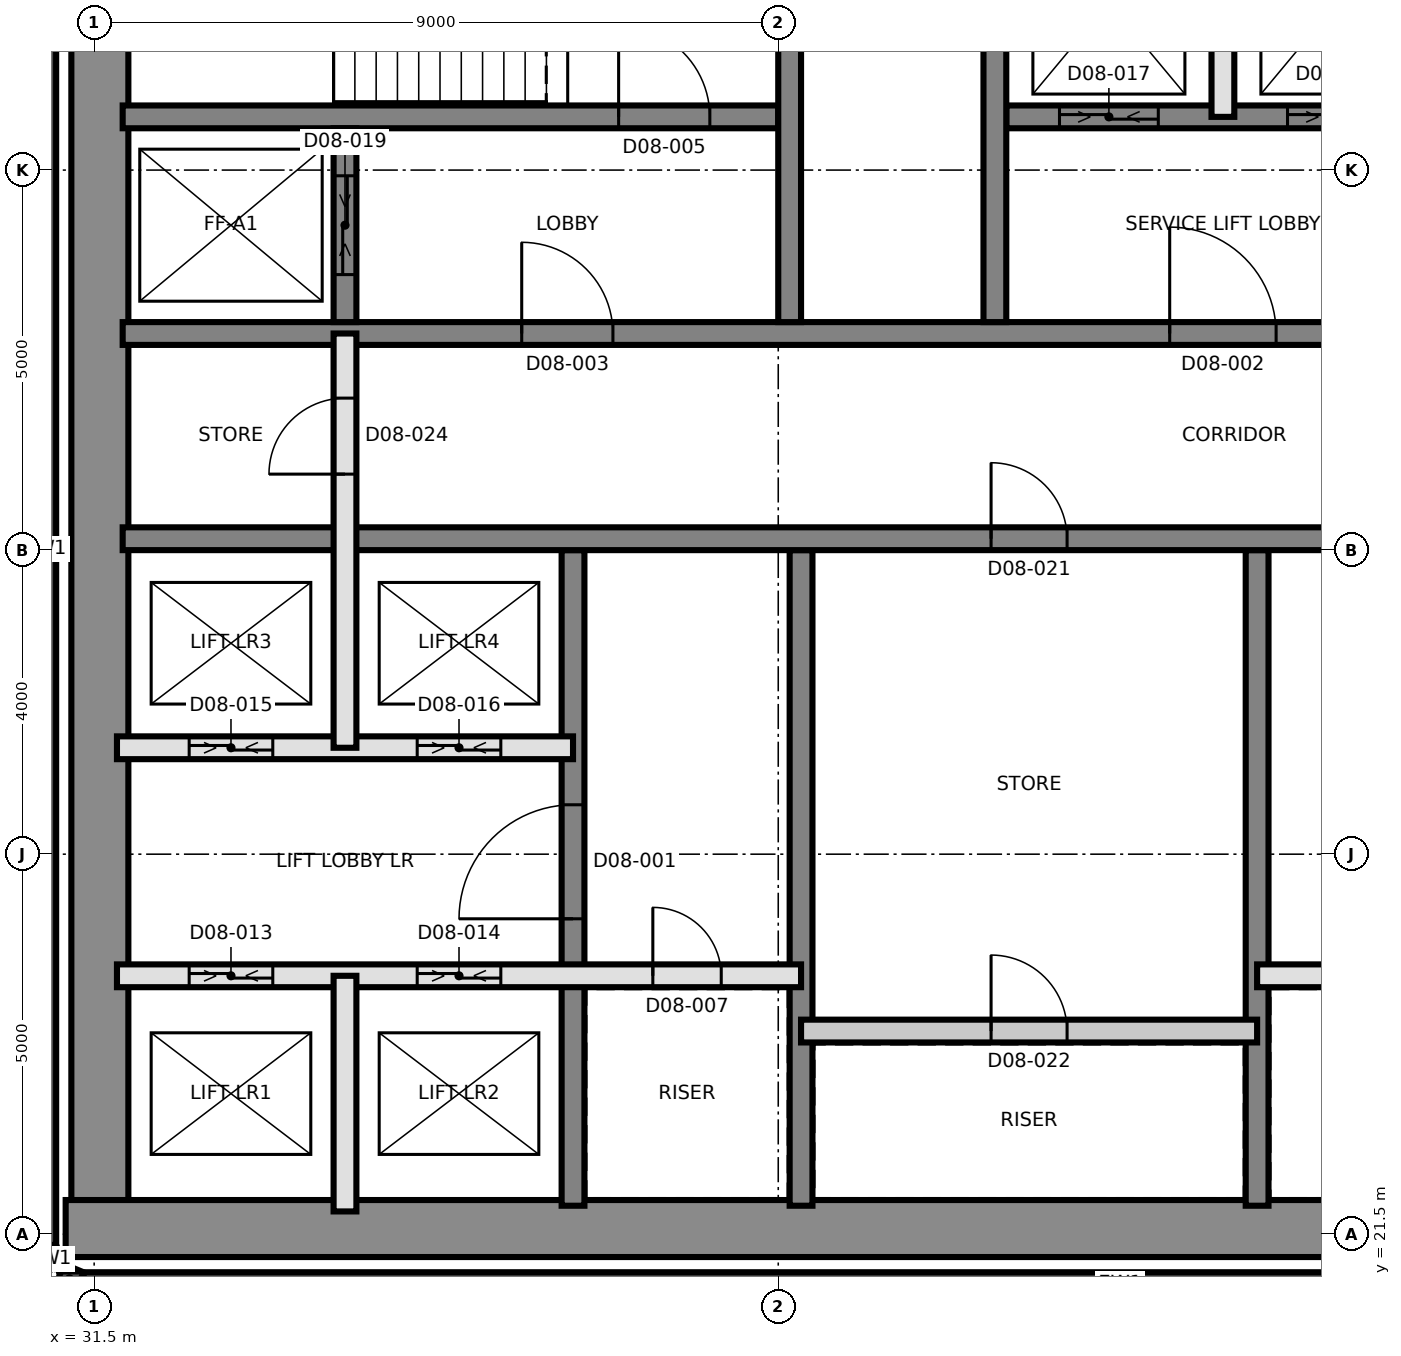
"""IFC4 building model, lengths in metres.
Left out: names, types, materials, properties, quantities, classifications, styles, units other than length and angle.
Written with IfcOpenShell. Run it as: python <this file> out.ifc"""

import sys

from ifc_helpers import new_model, si_unit, direction, frame, frame_2d, origin, place, context, subcontext, project, spatial, rectangle, extrude, element, fill, save


model = new_model("IFC4")
c1 = context("Model", 3, precision=1e-05, world=origin(), true_north=direction((0.0, 1.0)))
c2 = subcontext(c1, "Body", "Model", "MODEL_VIEW")
j1 = project(units=[si_unit("LENGTHUNIT", "METRE"), si_unit("PLANEANGLEUNIT", "RADIAN")], contexts=[c1])
p1 = place(None, origin())
s1 = spatial("IfcSite", under=j1, at=p1, CompositionType="ELEMENT")
p2 = place(p1, origin())
s2 = spatial("IfcBuilding", under=s1, at=p2, CompositionType="ELEMENT")
p3 = place(p2, frame((0.0, 0.0, 101.9)))
s3 = spatial("IfcBuildingStorey", under=s2, at=p3, CompositionType="ELEMENT", Elevation=101.9)
p4 = place(p3, frame((31.575, 21.875, 0.0), z_axis=(0.0, 0.0, 1.0), x_axis=(0.0, 1.0, 0.0)))
e1 = element("IfcWall", 1, at=p4, inside=s3, PredefinedType="SHEAR", context=c2, shape_type="SweptSolid", body=[
    extrude(rectangle(XDim=17.25, YDim=0.75, at=frame_2d((8.625, 0.0))), origin(), (0.0, 0.0, 1.0), 3.7),
])
p5 = place(p3, frame((31.125, 21.575, 0.0), z_axis=(0.0, 0.0, 1.0), x_axis=(1.0, 0.0, 0.0)))
e2 = element("IfcWall", 2, at=p5, inside=s3, PredefinedType="SHEAR", context=c2, shape_type="SweptSolid", body=[
    extrude(rectangle(XDim=27.0, YDim=0.75, at=frame_2d((13.5, 0.0))), origin(), (0.0, 0.0, 1.0), 3.7),
])
p6 = place(p3, frame((37.8, 21.875, 0.0), z_axis=(0.0, 0.0, 1.0), x_axis=(0.0, 1.0, 0.0)))
e3 = element("IfcWall", 3, at=p6, inside=s3, PredefinedType="SHEAR", context=c2, shape_type="SweptSolid", body=[
    extrude(rectangle(XDim=8.625, YDim=0.3, at=frame_2d((4.312, 0.0))), origin(), (0.0, 0.0, 1.0), 3.7),
])
p7 = place(p6, frame((3.775, 0.0, 0.0)))
e4 = element("IfcOpeningElement", 4, at=p7, cuts=e3, PredefinedType="OPENING", context=c2, shape_type="SweptSolid", body=[
    extrude(rectangle(XDim=1.5, YDim=2.1, at=frame_2d((0.75, 1.05))), frame((0.0, 0.16, 0.0), z_axis=(0.0, -1.0, 0.0), x_axis=(1.0, 0.0, 0.0)), (0.0, 0.0, 1.0), 0.32),
])
for number, where, z_axis, x_axis in (
    (5, (40.8, 21.875, 0.0), (0.0, 0.0, 1.0), (0.0, 1.0, 0.0)),
    (6, (46.8, 21.875, 0.0), (0.0, 0.0, 1.0), (0.0, 1.0, 0.0)),
):
    element("IfcWall", number, at=place(p3, frame(where, z_axis=z_axis, x_axis=x_axis)), inside=s3, PredefinedType="SHEAR", context=c2, shape_type="SweptSolid", body=[
        extrude(rectangle(XDim=8.625, YDim=0.3, at=frame_2d((4.312, 0.0))), origin(), (0.0, 0.0, 1.0), 3.7),
    ])
p8 = place(p3, frame((31.875, 30.65, 0.0), z_axis=(0.0, 0.0, 1.0), x_axis=(1.0, 0.0, 0.0)))
e7 = element("IfcWall", 7, at=p8, inside=s3, PredefinedType="SHEAR", context=c2, shape_type="SweptSolid", body=[
    extrude(rectangle(XDim=26.25, YDim=0.3, at=frame_2d((13.125, 0.0))), origin(), (0.0, 0.0, 1.0), 3.7),
])
p9 = place(p8, frame((24.625, 0.0, 0.0)))
e8 = element("IfcOpeningElement", 8, at=p9, cuts=e7, PredefinedType="OPENING", context=c2, shape_type="SweptSolid", body=[
    extrude(rectangle(XDim=1.0, YDim=2.1, at=frame_2d((0.5, 1.05))), frame((0.0, 0.16, 0.0), z_axis=(0.0, -1.0, 0.0), x_axis=(1.0, 0.0, 0.0)), (0.0, 0.0, 1.0), 0.32),
])
p10 = place(p8, frame((11.425, 0.0, 0.0)))
e9 = element("IfcOpeningElement", 9, at=p10, cuts=e7, PredefinedType="OPENING", context=c2, shape_type="SweptSolid", body=[
    extrude(rectangle(XDim=1.0, YDim=2.1, at=frame_2d((0.5, 1.05))), frame((0.0, 0.16, 0.0), z_axis=(0.0, -1.0, 0.0), x_axis=(1.0, 0.0, 0.0)), (0.0, 0.0, 1.0), 0.32),
])
p11 = place(p3, frame((31.875, 33.35, 0.0), z_axis=(0.0, 0.0, 1.0), x_axis=(1.0, 0.0, 0.0)))
e10 = element("IfcWall", 10, at=p11, inside=s3, PredefinedType="SHEAR", context=c2, shape_type="SweptSolid", body=[
    extrude(rectangle(XDim=26.25, YDim=0.3, at=frame_2d((13.125, 0.0))), origin(), (0.0, 0.0, 1.0), 3.7),
])
p12 = place(p11, frame((13.775, 0.0, 0.0)))
e11 = element("IfcOpeningElement", 11, at=p12, cuts=e10, PredefinedType="OPENING", context=c2, shape_type="SweptSolid", body=[
    extrude(rectangle(XDim=1.4, YDim=2.1, at=frame_2d((0.7, 1.05))), frame((0.0, 0.16, 0.0), z_axis=(0.0, -1.0, 0.0), x_axis=(1.0, 0.0, 0.0)), (0.0, 0.0, 1.0), 0.32),
])
p13 = place(p11, frame((5.25, 0.0, 0.0)))
e12 = element("IfcOpeningElement", 12, at=p13, cuts=e10, PredefinedType="OPENING", context=c2, shape_type="SweptSolid", body=[
    extrude(rectangle(XDim=1.2, YDim=2.1, at=frame_2d((0.6, 1.05))), frame((0.0, 0.16, 0.0), z_axis=(0.0, -1.0, 0.0), x_axis=(1.0, 0.0, 0.0)), (0.0, 0.0, 1.0), 0.32),
])
p14 = place(p11, frame((19.8, 0.0, 0.0)))
e13 = element("IfcOpeningElement", 13, at=p14, cuts=e10, PredefinedType="OPENING", context=c2, shape_type="SweptSolid", body=[
    extrude(rectangle(XDim=1.2, YDim=2.1, at=frame_2d((0.6, 1.05))), frame((0.0, 0.16, 0.0), z_axis=(0.0, -1.0, 0.0), x_axis=(1.0, 0.0, 0.0)), (0.0, 0.0, 1.0), 0.32),
])
p15 = place(p3, frame((31.875, 36.2, 0.0), z_axis=(0.0, 0.0, 1.0), x_axis=(1.0, 0.0, 0.0)))
e14 = element("IfcWall", 14, at=p15, inside=s3, PredefinedType="SHEAR", context=c2, shape_type="SweptSolid", body=[
    extrude(rectangle(XDim=8.625, YDim=0.3, at=frame_2d((4.312, 0.0))), origin(), (0.0, 0.0, 1.0), 3.7),
])
p16 = place(p15, frame((6.525, 0.0, 0.0)))
e15 = element("IfcOpeningElement", 15, at=p16, cuts=e14, PredefinedType="OPENING", context=c2, shape_type="SweptSolid", body=[
    extrude(rectangle(XDim=1.2, YDim=2.1, at=frame_2d((0.6, 1.05))), frame((0.0, 0.16, 0.0), z_axis=(0.0, -1.0, 0.0), x_axis=(1.0, 0.0, 0.0)), (0.0, 0.0, 1.0), 0.32),
])
p17 = place(p3, frame((43.5, 36.2, 0.0), z_axis=(0.0, 0.0, 1.0), x_axis=(1.0, 0.0, 0.0)))
e16 = element("IfcWall", 16, at=p17, inside=s3, PredefinedType="SHEAR", context=c2, shape_type="SweptSolid", body=[
    extrude(rectangle(XDim=14.625, YDim=0.3, at=frame_2d((7.312, 0.0))), origin(), (0.0, 0.0, 1.0), 3.7),
])
p18 = place(p17, frame((6.9, 0.0, 0.0)))
e17 = element("IfcOpeningElement", 17, at=p18, cuts=e16, PredefinedType="OPENING", context=c2, shape_type="SweptSolid", body=[
    extrude(rectangle(XDim=1.2, YDim=2.1, at=frame_2d((0.6, 1.05))), frame((0.0, 0.16, 0.0), z_axis=(0.0, -1.0, 0.0), x_axis=(1.0, 0.0, 0.0)), (0.0, 0.0, 1.0), 0.32),
])
p19 = place(p17, frame((0.7, 0.0, 0.0)))
e18 = element("IfcOpeningElement", 18, at=p19, cuts=e16, PredefinedType="OPENING", context=c2, shape_type="SweptSolid", body=[
    extrude(rectangle(XDim=1.3, YDim=2.4, at=frame_2d((0.65, 1.2))), frame((0.0, 0.16, 0.0), z_axis=(0.0, -1.0, 0.0), x_axis=(1.0, 0.0, 0.0)), (0.0, 0.0, 1.0), 0.32),
])
p20 = place(p17, frame((3.7, 0.0, 0.0)))
e19 = element("IfcOpeningElement", 19, at=p20, cuts=e16, PredefinedType="OPENING", context=c2, shape_type="SweptSolid", body=[
    extrude(rectangle(XDim=1.3, YDim=2.4, at=frame_2d((0.65, 1.2))), frame((0.0, 0.16, 0.0), z_axis=(0.0, -1.0, 0.0), x_axis=(1.0, 0.0, 0.0)), (0.0, 0.0, 1.0), 0.32),
])
for number, where, z_axis, x_axis in (
    (20, (40.65, 33.5, 0.0), (0.0, 0.0, 1.0), (0.0, 1.0, 0.0)),
    (21, (43.35, 33.5, 0.0), (0.0, 0.0, 1.0), (0.0, 1.0, 0.0)),
):
    element("IfcWall", number, at=place(p3, frame(where, z_axis=z_axis, x_axis=x_axis)), inside=s3, PredefinedType="SHEAR", context=c2, shape_type="SweptSolid", body=[
        extrude(rectangle(XDim=5.625, YDim=0.3, at=frame_2d((2.812, 0.0))), origin(), (0.0, 0.0, 1.0), 3.7),
    ])
p21 = place(p3, frame((34.8, 33.5, 0.0), z_axis=(0.0, 0.0, 1.0), x_axis=(0.0, 1.0, 0.0)))
e22 = element("IfcWall", 22, at=p21, inside=s3, PredefinedType="SHEAR", context=c2, shape_type="SweptSolid", body=[
    extrude(rectangle(XDim=2.55, YDim=0.3, at=frame_2d((1.275, 0.0))), origin(), (0.0, 0.0, 1.0), 3.7),
])
p22 = place(p21, frame((0.625, 0.0, 0.0)))
e23 = element("IfcOpeningElement", 23, at=p22, cuts=e22, PredefinedType="OPENING", context=c2, shape_type="SweptSolid", body=[
    extrude(rectangle(XDim=1.3, YDim=2.4, at=frame_2d((0.65, 1.2))), frame((0.0, 0.16, 0.0), z_axis=(0.0, -1.0, 0.0), x_axis=(1.0, 0.0, 0.0)), (0.0, 0.0, 1.0), 0.32),
])
p23 = place(p3, frame((30.85, 39.67, 0.0), z_axis=(0.0, 0.0, 1.0), x_axis=(0.0, -1.0, 0.0)))
e24 = element("IfcWall", 24, at=p23, inside=s3, PredefinedType="SOLIDWALL", context=c2, shape_type="SweptSolid", body=[
    extrude(rectangle(XDim=18.31, YDim=0.3, at=frame_2d((9.155, 0.0))), origin(), (0.0, 0.0, 1.0), 3.4),
])
for number, where, z_axis, x_axis in (
    (25, (30.861, 21.302, 0.0), (0.0, 0.0, 1.0), (0.383, -0.924, 0.0)),
    (26, (31.048, 20.967, 0.0), (0.0, 0.0, 1.0), (0.924, -0.383, 0.0)),
):
    element("IfcWall", number, at=place(p3, frame(where, z_axis=z_axis, x_axis=x_axis)), inside=s3, PredefinedType="SOLIDWALL", context=c2, shape_type="SweptSolid", body=[
        extrude(rectangle(XDim=0.275, YDim=0.3, at=frame_2d((0.138, 0.0))), origin(), (0.0, 0.0, 1.0), 3.4),
    ])
p24 = place(p3, frame((31.36, 20.85, 0.0), z_axis=(0.0, 0.0, 1.0), x_axis=(1.0, 0.0, 0.0)))
e27 = element("IfcWall", 27, at=p24, inside=s3, PredefinedType="SOLIDWALL", context=c2, shape_type="SweptSolid", body=[
    extrude(rectangle(XDim=27.281, YDim=0.3, at=frame_2d((13.64, 0.0))), origin(), (0.0, 0.0, 1.0), 3.4),
])
p25 = place(p3, frame((40.8, 24.173, 0.0), z_axis=(0.0, 0.0, 1.0), x_axis=(1.0, 0.0, 0.0)))
e28 = element("IfcWall", 28, at=p25, inside=s3, PredefinedType="PARTITIONING", context=c2, shape_type="SweptSolid", body=[
    extrude(rectangle(XDim=6.0, YDim=0.3, at=frame_2d((3.0, 0.0))), origin(), (0.0, 0.0, 1.0), 3.4),
])
p26 = place(p25, frame((2.5, 0.0, 0.0)))
e29 = element("IfcOpeningElement", 29, at=p26, cuts=e28, PredefinedType="OPENING", context=c2, shape_type="SweptSolid", body=[
    extrude(rectangle(XDim=1.0, YDim=2.1, at=frame_2d((0.5, 1.05))), frame((0.0, 0.16, 0.0), z_axis=(0.0, -1.0, 0.0), x_axis=(1.0, 0.0, 0.0)), (0.0, 0.0, 1.0), 0.32),
])
p27 = place(p3, frame((31.8, 24.9, 0.0), z_axis=(0.0, 0.0, 1.0), x_axis=(1.0, 0.0, 0.0)))
e30 = element("IfcWall", 30, at=p27, inside=s3, PredefinedType="SOLIDWALL", context=c2, shape_type="SweptSolid", body=[
    extrude(rectangle(XDim=9.0, YDim=0.3, at=frame_2d((4.5, 0.0))), origin(), (0.0, 0.0, 1.0), 3.4),
])
p28 = place(p27, frame((7.05, 0.0, 0.0)))
e31 = element("IfcOpeningElement", 31, at=p28, cuts=e30, PredefinedType="OPENING", context=c2, shape_type="SweptSolid", body=[
    extrude(rectangle(XDim=0.9, YDim=2.1, at=frame_2d((0.45, 1.05))), frame((0.0, 0.16, 0.0), z_axis=(0.0, -1.0, 0.0), x_axis=(1.0, 0.0, 0.0)), (0.0, 0.0, 1.0), 0.32),
])
p29 = place(p27, frame((0.95, 0.0, 0.0)))
e32 = element("IfcOpeningElement", 32, at=p29, cuts=e30, PredefinedType="OPENING", context=c2, shape_type="SweptSolid", body=[
    extrude(rectangle(XDim=1.1, YDim=2.4, at=frame_2d((0.55, 1.2))), frame((0.0, 0.16, 0.0), z_axis=(0.0, -1.0, 0.0), x_axis=(1.0, 0.0, 0.0)), (0.0, 0.0, 1.0), 0.32),
])
p30 = place(p27, frame((3.95, 0.0, 0.0)))
e33 = element("IfcOpeningElement", 33, at=p30, cuts=e30, PredefinedType="OPENING", context=c2, shape_type="SweptSolid", body=[
    extrude(rectangle(XDim=1.1, YDim=2.4, at=frame_2d((0.55, 1.2))), frame((0.0, 0.16, 0.0), z_axis=(0.0, -1.0, 0.0), x_axis=(1.0, 0.0, 0.0)), (0.0, 0.0, 1.0), 0.32),
])
p31 = place(p3, frame((46.8, 24.9, 0.0), z_axis=(0.0, 0.0, 1.0), x_axis=(1.0, 0.0, 0.0)))
e34 = element("IfcWall", 34, at=p31, inside=s3, PredefinedType="SOLIDWALL", context=c2, shape_type="SweptSolid", body=[
    extrude(rectangle(XDim=9.0, YDim=0.3, at=frame_2d((4.5, 0.0))), origin(), (0.0, 0.0, 1.0), 3.4),
])
p32 = place(p31, frame((1.05, 0.0, 0.0)))
e35 = element("IfcOpeningElement", 35, at=p32, cuts=e34, PredefinedType="OPENING", context=c2, shape_type="SweptSolid", body=[
    extrude(rectangle(XDim=0.9, YDim=2.1, at=frame_2d((0.45, 1.05))), frame((0.0, 0.16, 0.0), z_axis=(0.0, -1.0, 0.0), x_axis=(1.0, 0.0, 0.0)), (0.0, 0.0, 1.0), 0.32),
])
p33 = place(p3, frame((31.8, 27.9, 0.0), z_axis=(0.0, 0.0, 1.0), x_axis=(1.0, 0.0, 0.0)))
e36 = element("IfcWall", 36, at=p33, inside=s3, PredefinedType="SOLIDWALL", context=c2, shape_type="SweptSolid", body=[
    extrude(rectangle(XDim=6.0, YDim=0.3, at=frame_2d((3.0, 0.0))), origin(), (0.0, 0.0, 1.0), 3.4),
])
p34 = place(p33, frame((0.95, 0.0, 0.0)))
e37 = element("IfcOpeningElement", 37, at=p34, cuts=e36, PredefinedType="OPENING", context=c2, shape_type="SweptSolid", body=[
    extrude(rectangle(XDim=1.1, YDim=2.4, at=frame_2d((0.55, 1.2))), frame((0.0, 0.16, 0.0), z_axis=(0.0, -1.0, 0.0), x_axis=(1.0, 0.0, 0.0)), (0.0, 0.0, 1.0), 0.32),
])
p35 = place(p33, frame((3.95, 0.0, 0.0)))
e38 = element("IfcOpeningElement", 38, at=p35, cuts=e36, PredefinedType="OPENING", context=c2, shape_type="SweptSolid", body=[
    extrude(rectangle(XDim=1.1, YDim=2.4, at=frame_2d((0.55, 1.2))), frame((0.0, 0.16, 0.0), z_axis=(0.0, -1.0, 0.0), x_axis=(1.0, 0.0, 0.0)), (0.0, 0.0, 1.0), 0.32),
])
p36 = place(p3, frame((34.8, 21.8, 0.0), z_axis=(0.0, 0.0, 1.0), x_axis=(0.0, 1.0, 0.0)))
e39 = element("IfcWall", 39, at=p36, inside=s3, PredefinedType="SOLIDWALL", context=c2, shape_type="SweptSolid", body=[
    extrude(rectangle(XDim=3.1, YDim=0.3, at=frame_2d((1.55, 0.0))), origin(), (0.0, 0.0, 1.0), 3.4),
])
p37 = place(p3, frame((34.8, 27.9, 0.0), z_axis=(0.0, 0.0, 1.0), x_axis=(0.0, 1.0, 0.0)))
e40 = element("IfcWall", 40, at=p37, inside=s3, PredefinedType="SOLIDWALL", context=c2, shape_type="SweptSolid", body=[
    extrude(rectangle(XDim=5.45, YDim=0.3, at=frame_2d((2.725, 0.0))), origin(), (0.0, 0.0, 1.0), 3.4),
])
p38 = place(p37, frame((3.6, 0.0, 0.0)))
e41 = element("IfcOpeningElement", 41, at=p38, cuts=e40, PredefinedType="OPENING", context=c2, shape_type="SweptSolid", body=[
    extrude(rectangle(XDim=1.0, YDim=2.1, at=frame_2d((0.5, 1.05))), frame((0.0, 0.16, 0.0), z_axis=(0.0, -1.0, 0.0), x_axis=(1.0, 0.0, 0.0)), (0.0, 0.0, 1.0), 0.32),
])
p39 = place(p3, frame((46.35, 36.2, 0.0), z_axis=(0.0, 0.0, 1.0), x_axis=(0.0, 1.0, 0.0)))
e42 = element("IfcWall", 42, at=p39, inside=s3, PredefinedType="SOLIDWALL", context=c2, shape_type="SweptSolid", body=[
    extrude(rectangle(XDim=3.0, YDim=0.3, at=frame_2d((1.5, 0.0))), origin(), (0.0, 0.0, 1.0), 3.4),
])
p40 = place(p7, origin())
e43 = element("IfcDoor", 43, at=p40, inside=s3, OperationType="SINGLE_SWING_LEFT", PredefinedType="DOOR", context=c2, shape_type="SweptSolid", body=[
    extrude(rectangle(XDim=1.5, YDim=2.1, at=frame_2d((0.75, 1.05))), frame((0.0, 0.025, 0.0), z_axis=(0.0, -1.0, 0.0), x_axis=(1.0, 0.0, 0.0)), (0.0, 0.0, 1.0), 0.05),
])
fill(e4, e43)
p41 = place(p12, origin())
e44 = element("IfcDoor", 44, at=p41, inside=s3, OperationType="SINGLE_SWING_RIGHT", PredefinedType="DOOR", context=c2, shape_type="SweptSolid", body=[
    extrude(rectangle(XDim=1.4, YDim=2.1, at=frame_2d((0.7, 1.05))), frame((0.0, 0.025, 0.0), z_axis=(0.0, -1.0, 0.0), x_axis=(1.0, 0.0, 0.0)), (0.0, 0.0, 1.0), 0.05),
])
fill(e11, e44)
p42 = place(p13, origin())
e45 = element("IfcDoor", 45, at=p42, inside=s3, OperationType="SINGLE_SWING_LEFT", PredefinedType="DOOR", context=c2, shape_type="SweptSolid", body=[
    extrude(rectangle(XDim=1.2, YDim=2.1, at=frame_2d((0.6, 1.05))), frame((0.0, 0.025, 0.0), z_axis=(0.0, -1.0, 0.0), x_axis=(1.0, 0.0, 0.0)), (0.0, 0.0, 1.0), 0.05),
])
fill(e12, e45)
p43 = place(p16, origin())
e46 = element("IfcDoor", 46, at=p43, inside=s3, OperationType="SINGLE_SWING_RIGHT", PredefinedType="DOOR", context=c2, shape_type="SweptSolid", body=[
    extrude(rectangle(XDim=1.2, YDim=2.1, at=frame_2d((0.6, 1.05))), frame((0.0, 0.025, 0.0), z_axis=(0.0, -1.0, 0.0), x_axis=(1.0, 0.0, 0.0)), (0.0, 0.0, 1.0), 0.05),
])
fill(e15, e46)
p44 = place(p28, origin())
e47 = element("IfcDoor", 47, at=p44, inside=s3, OperationType="SINGLE_SWING_LEFT", PredefinedType="DOOR", context=c2, shape_type="SweptSolid", body=[
    extrude(rectangle(XDim=0.9, YDim=2.1, at=frame_2d((0.45, 1.05))), frame((0.0, 0.025, 0.0), z_axis=(0.0, -1.0, 0.0), x_axis=(1.0, 0.0, 0.0)), (0.0, 0.0, 1.0), 0.05),
])
fill(e31, e47)
p45 = place(p29, origin())
e48 = element("IfcDoor", 48, at=p45, inside=s3, OperationType="SLIDING_TO_LEFT", PredefinedType="DOOR", context=c2, shape_type="SweptSolid", body=[
    extrude(rectangle(XDim=1.1, YDim=2.4, at=frame_2d((0.55, 1.2))), frame((0.0, 0.025, 0.0), z_axis=(0.0, -1.0, 0.0), x_axis=(1.0, 0.0, 0.0)), (0.0, 0.0, 1.0), 0.05),
])
fill(e32, e48)
p46 = place(p30, origin())
e49 = element("IfcDoor", 49, at=p46, inside=s3, OperationType="SLIDING_TO_LEFT", PredefinedType="DOOR", context=c2, shape_type="SweptSolid", body=[
    extrude(rectangle(XDim=1.1, YDim=2.4, at=frame_2d((0.55, 1.2))), frame((0.0, 0.025, 0.0), z_axis=(0.0, -1.0, 0.0), x_axis=(1.0, 0.0, 0.0)), (0.0, 0.0, 1.0), 0.05),
])
fill(e33, e49)
p47 = place(p34, origin())
e50 = element("IfcDoor", 50, at=p47, inside=s3, OperationType="SLIDING_TO_LEFT", PredefinedType="DOOR", context=c2, shape_type="SweptSolid", body=[
    extrude(rectangle(XDim=1.1, YDim=2.4, at=frame_2d((0.55, 1.2))), frame((0.0, 0.025, 0.0), z_axis=(0.0, -1.0, 0.0), x_axis=(1.0, 0.0, 0.0)), (0.0, 0.0, 1.0), 0.05),
])
fill(e37, e50)
p48 = place(p35, origin())
e51 = element("IfcDoor", 51, at=p48, inside=s3, OperationType="SLIDING_TO_LEFT", PredefinedType="DOOR", context=c2, shape_type="SweptSolid", body=[
    extrude(rectangle(XDim=1.1, YDim=2.4, at=frame_2d((0.55, 1.2))), frame((0.0, 0.025, 0.0), z_axis=(0.0, -1.0, 0.0), x_axis=(1.0, 0.0, 0.0)), (0.0, 0.0, 1.0), 0.05),
])
fill(e38, e51)
p49 = place(p19, origin())
e52 = element("IfcDoor", 52, at=p49, inside=s3, OperationType="SLIDING_TO_LEFT", PredefinedType="DOOR", context=c2, shape_type="SweptSolid", body=[
    extrude(rectangle(XDim=1.3, YDim=2.4, at=frame_2d((0.65, 1.2))), frame((0.0, 0.025, 0.0), z_axis=(0.0, -1.0, 0.0), x_axis=(1.0, 0.0, 0.0)), (0.0, 0.0, 1.0), 0.05),
])
fill(e18, e52)
p50 = place(p20, origin())
e53 = element("IfcDoor", 53, at=p50, inside=s3, OperationType="SLIDING_TO_LEFT", PredefinedType="DOOR", context=c2, shape_type="SweptSolid", body=[
    extrude(rectangle(XDim=1.3, YDim=2.4, at=frame_2d((0.65, 1.2))), frame((0.0, 0.025, 0.0), z_axis=(0.0, -1.0, 0.0), x_axis=(1.0, 0.0, 0.0)), (0.0, 0.0, 1.0), 0.05),
])
fill(e19, e53)
p51 = place(p22, origin())
e54 = element("IfcDoor", 54, at=p51, inside=s3, OperationType="SLIDING_TO_LEFT", PredefinedType="DOOR", context=c2, shape_type="SweptSolid", body=[
    extrude(rectangle(XDim=1.3, YDim=2.4, at=frame_2d((0.65, 1.2))), frame((0.0, 0.025, 0.0), z_axis=(0.0, -1.0, 0.0), x_axis=(1.0, 0.0, 0.0)), (0.0, 0.0, 1.0), 0.05),
])
fill(e23, e54)
p52 = place(p10, origin())
e55 = element("IfcDoor", 55, at=p52, inside=s3, OperationType="SINGLE_SWING_LEFT", PredefinedType="DOOR", context=c2, shape_type="SweptSolid", body=[
    extrude(rectangle(XDim=1.0, YDim=2.1, at=frame_2d((0.5, 1.05))), frame((0.0, 0.025, 0.0), z_axis=(0.0, -1.0, 0.0), x_axis=(1.0, 0.0, 0.0)), (0.0, 0.0, 1.0), 0.05),
])
fill(e9, e55)
p53 = place(p26, origin())
e56 = element("IfcDoor", 56, at=p53, inside=s3, OperationType="SINGLE_SWING_RIGHT", PredefinedType="DOOR", context=c2, shape_type="SweptSolid", body=[
    extrude(rectangle(XDim=1.0, YDim=2.1, at=frame_2d((0.5, 1.05))), frame((0.0, 0.025, 0.0), z_axis=(0.0, -1.0, 0.0), x_axis=(1.0, 0.0, 0.0)), (0.0, 0.0, 1.0), 0.05),
])
fill(e29, e56)
p54 = place(p38, origin())
e57 = element("IfcDoor", 57, at=p54, inside=s3, OperationType="SINGLE_SWING_RIGHT", PredefinedType="DOOR", context=c2, shape_type="SweptSolid", body=[
    extrude(rectangle(XDim=1.0, YDim=2.1, at=frame_2d((0.5, 1.05))), frame((0.0, 0.025, 0.0), z_axis=(0.0, -1.0, 0.0), x_axis=(1.0, 0.0, 0.0)), (0.0, 0.0, 1.0), 0.05),
])
fill(e41, e57)
save(model, sys.argv[1])
